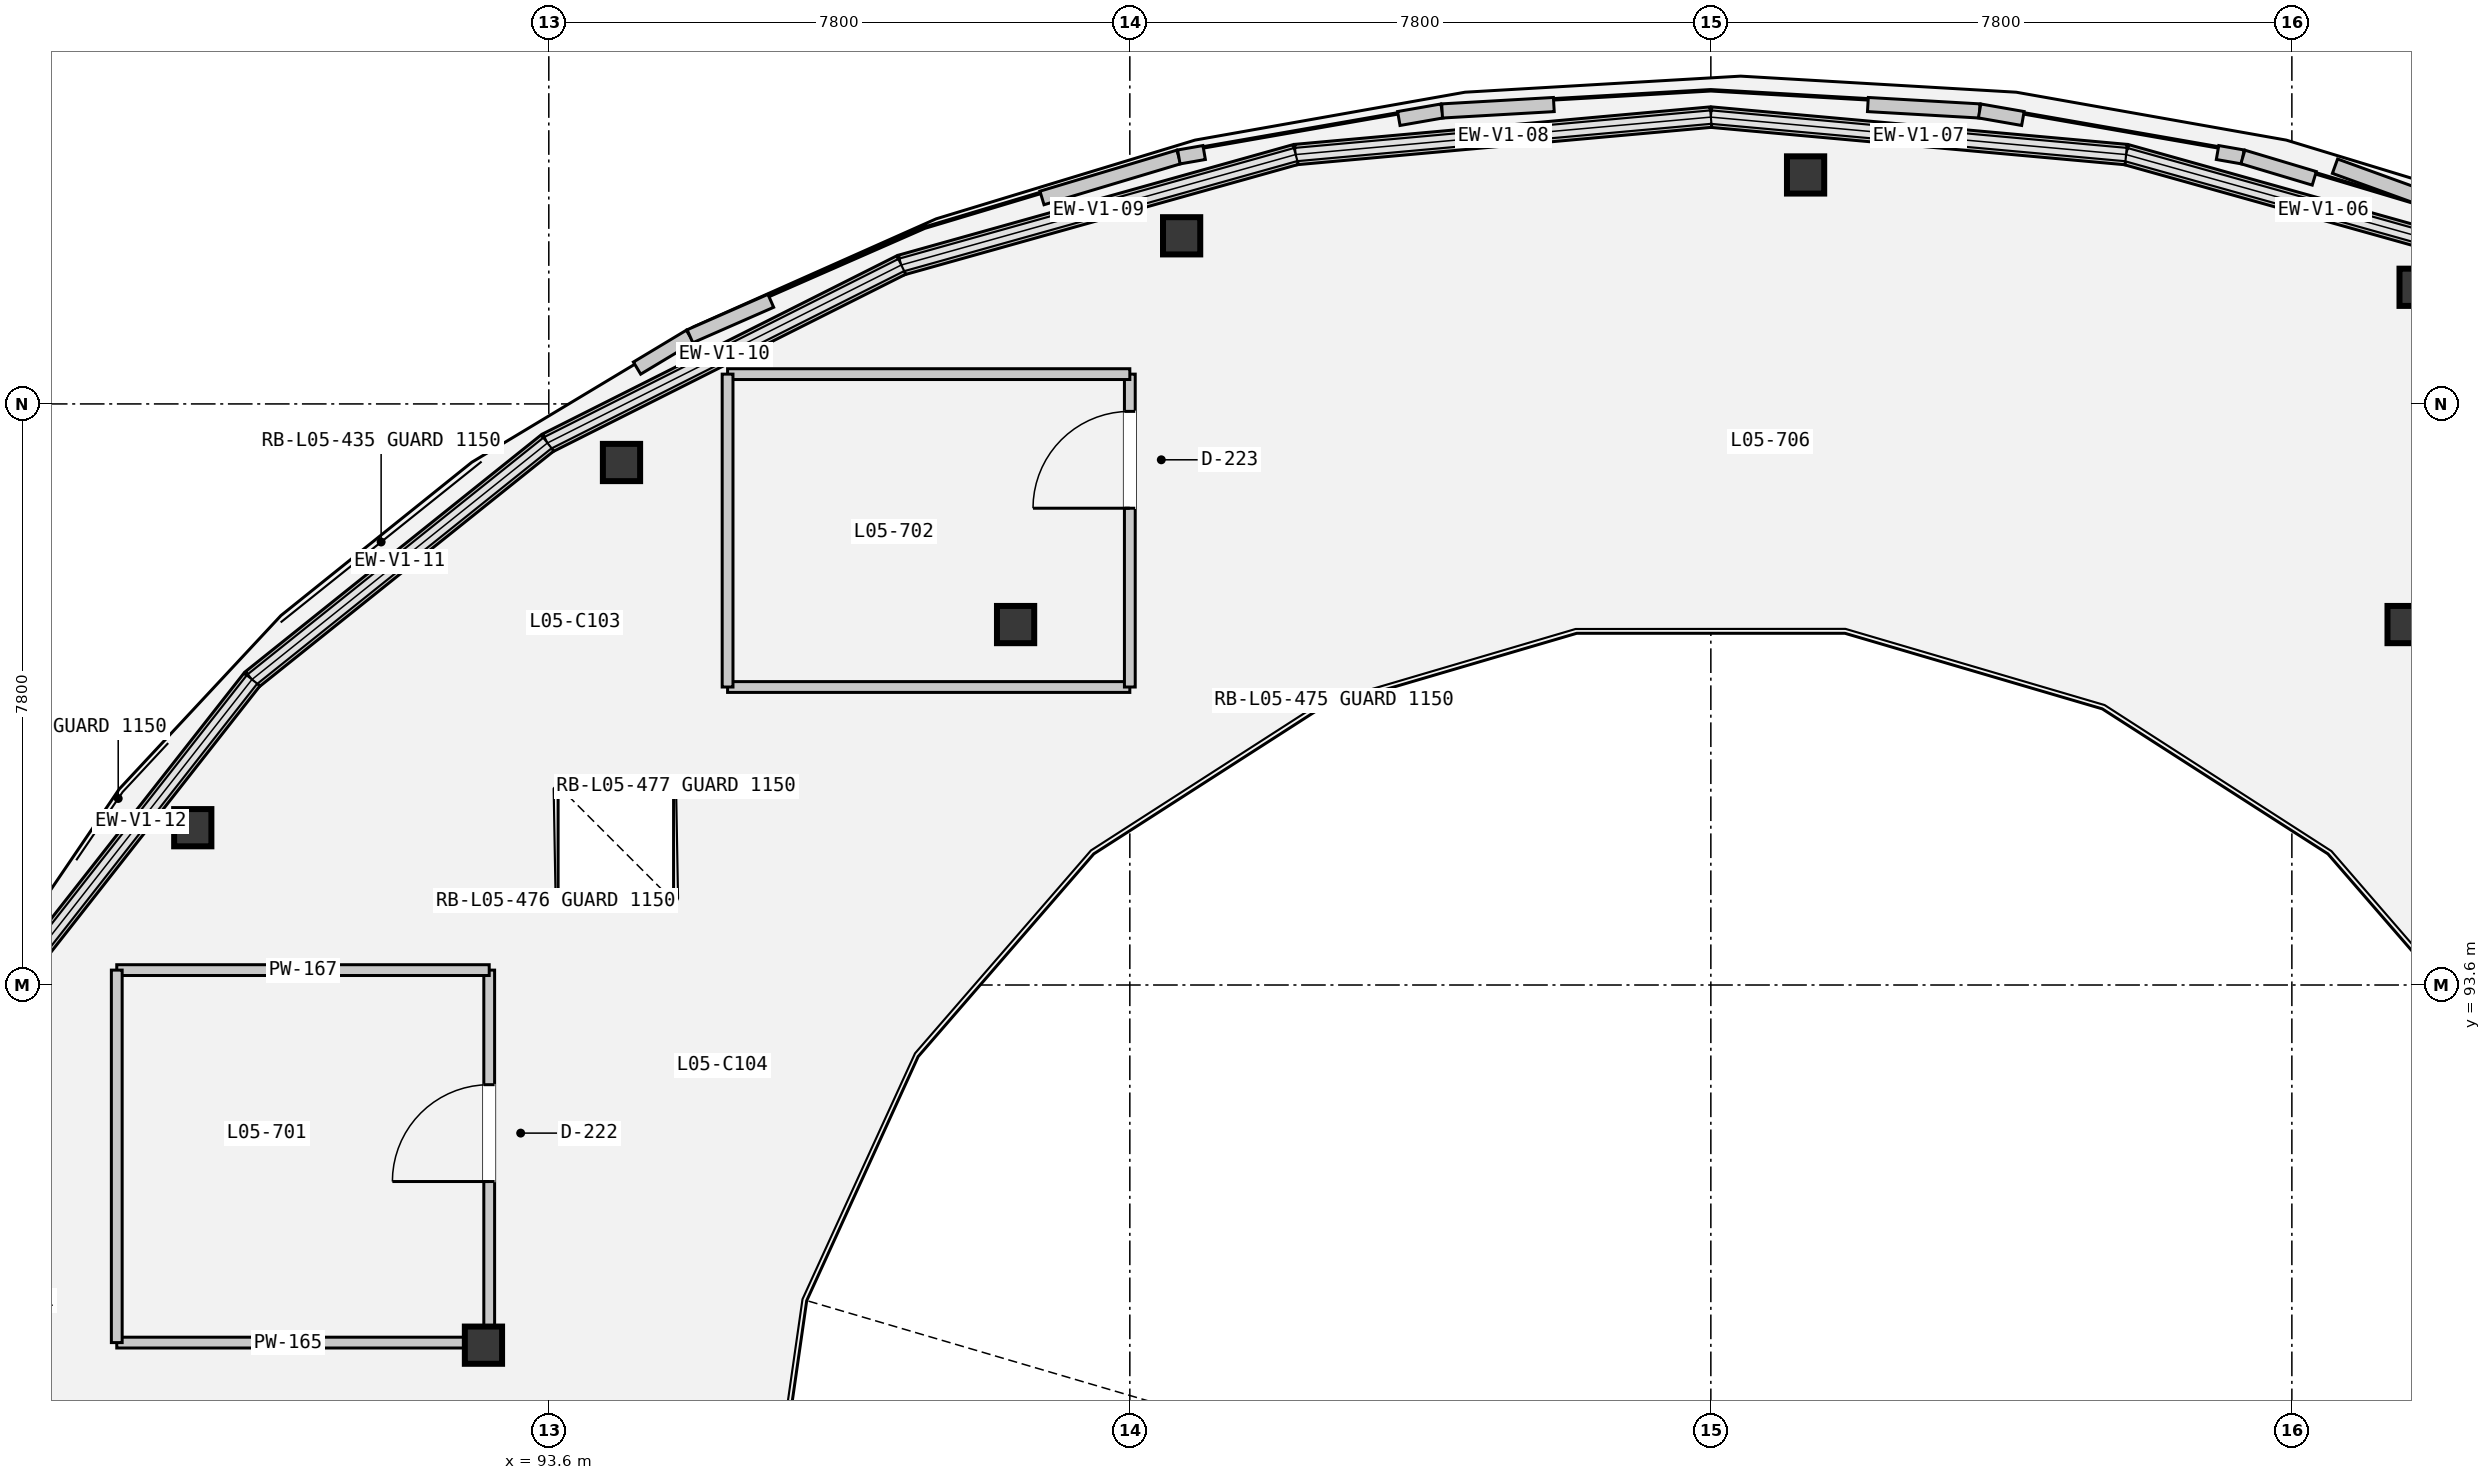
"""IFC4 building model, lengths in metres.
Left out: names, types, materials, properties, quantities, classifications, styles, units other than length and angle.
Written with IfcOpenShell. Run it as: python <this file> out.ifc"""

import sys

from ifc_helpers import new_model, si_unit, direction, frame, frame_2d, origin, origin_2d, place, context, subcontext, project, spatial, rectangle, extrude, element, fill, save


model = new_model("IFC4")
c1 = context("Model", 3, precision=1e-05, world=origin(), true_north=direction((0.0, 1.0)))
c2 = subcontext(c1, "Body", "Model", "MODEL_VIEW")
j1 = project(units=[si_unit("LENGTHUNIT", "METRE"), si_unit("PLANEANGLEUNIT", "RADIAN")], contexts=[c1])
p1 = place(None, origin())
s1 = spatial("IfcSite", under=j1, at=p1, CompositionType="ELEMENT")
p2 = place(p1, origin())
s2 = spatial("IfcBuilding", under=s1, at=p2, CompositionType="ELEMENT")
p3 = place(p2, frame((0.0, 0.0, 24.3)))
s3 = spatial("IfcBuildingStorey", under=s2, at=p3, CompositionType="ELEMENT", Elevation=24.3)
for number, where, z_axis, x_axis in (
    (1, (118.695, 102.966, 0.0), (0.0, 0.0, 1.0), (1.0, 0.0, 0.0)),
    (2, (110.472, 104.474, 0.0), (0.0, 0.0, 1.0), (1.0, 0.0, 0.0)),
    (3, (102.095, 103.657, 0.0), (0.0, 0.0, 1.0), (1.0, 0.0, 0.0)),
    (4, (94.576, 100.614, 0.0), (0.0, 0.0, 1.0), (1.0, 0.0, 0.0)),
    (5, (88.82, 95.711, 0.0), (0.0, 0.0, 1.0), (1.0, 0.0, 0.0)),
    (6, (118.534, 98.438, 0.0), (0.0, 0.0, 1.0), (1.0, 0.0, 0.0)),
    (7, (99.866, 98.438, 0.0), (0.0, 0.0, 1.0), (1.0, 0.0, 0.0)),
    (8, (92.723, 88.765, 0.0), (0.0, 0.0, 1.0), (1.0, 0.0, 0.0)),
):
    element("IfcColumn", number, at=place(p3, frame(where, z_axis=z_axis, x_axis=x_axis)), inside=s3, PredefinedType="COLUMN", context=c2, shape_type="SweptSolid", body=[
        extrude(rectangle(XDim=0.5, YDim=0.5, at=origin_2d()), origin(), (0.0, 0.0, 1.0), 4.5),
    ])
p4 = place(p3, frame((120.069, 103.264, 0.0), z_axis=(0.0, 0.0, 1.0), x_axis=(-0.962945110284, 0.269697450079, 0.0)))
e9 = element("IfcWall", 9, at=p4, inside=s3, PredefinedType="SOLIDWALL", context=c2, shape_type="SweptSolid", body=[
    extrude(rectangle(XDim=5.499, YDim=0.275, at=frame_2d((2.749, 0.0))), origin(), (0.0, 0.0, 1.0), 1.02),
])
p5 = place(p3, frame((114.774, 104.747, 0.0), z_axis=(0.0, 0.0, 1.0), x_axis=(-0.995958378124, 0.08981597322, 0.0)))
e10 = element("IfcWall", 10, at=p5, inside=s3, PredefinedType="SOLIDWALL", context=c2, shape_type="SweptSolid", body=[
    extrude(rectangle(XDim=5.597, YDim=0.275, at=frame_2d((2.798, 0.0))), origin(), (0.0, 0.0, 1.0), 1.02),
])
p6 = place(p3, frame((109.2, 105.25, 0.0), z_axis=(0.0, 0.0, 1.0), x_axis=(-0.995958026213, -0.089819875431, 0.0)))
e11 = element("IfcWall", 11, at=p6, inside=s3, PredefinedType="SOLIDWALL", context=c2, shape_type="SweptSolid", body=[
    extrude(rectangle(XDim=5.597, YDim=0.275, at=frame_2d((2.798, 0.0))), origin(), (0.0, 0.0, 1.0), 1.02),
])
p7 = place(p3, frame((103.626, 104.747, 0.0), z_axis=(0.0, 0.0, 1.0), x_axis=(-0.962945110284, -0.269697450079, 0.0)))
e12 = element("IfcWall", 12, at=p7, inside=s3, PredefinedType="SOLIDWALL", context=c2, shape_type="SweptSolid", body=[
    extrude(rectangle(XDim=5.499, YDim=0.275, at=frame_2d((2.749, 0.0))), origin(), (0.0, 0.0, 1.0), 1.02),
])
p8 = place(p3, frame((98.331, 103.264, 0.0), z_axis=(0.0, 0.0, 1.0), x_axis=(-0.893386975115, -0.449288006401, 0.0)))
e13 = element("IfcWall", 13, at=p8, inside=s3, PredefinedType="SOLIDWALL", context=c2, shape_type="SweptSolid", body=[
    extrude(rectangle(XDim=5.317, YDim=0.275, at=frame_2d((2.658, 0.0))), origin(), (0.0, 0.0, 1.0), 1.02),
])
p9 = place(p3, frame((93.582, 100.876, 0.0), z_axis=(0.0, 0.0, 1.0), x_axis=(-0.780718767482, -0.624882553846, 0.0)))
e14 = element("IfcWall", 14, at=p9, inside=s3, PredefinedType="SOLIDWALL", context=c2, shape_type="SweptSolid", body=[
    extrude(rectangle(XDim=5.081, YDim=0.275, at=frame_2d((2.54, 0.0))), origin(), (0.0, 0.0, 1.0), 1.02),
])
p10 = place(p3, frame((89.615, 97.701, 0.0), z_axis=(0.0, 0.0, 1.0), x_axis=(-0.617498011037, -0.786572441906, 0.0)))
e15 = element("IfcWall", 15, at=p10, inside=s3, PredefinedType="SOLIDWALL", context=c2, shape_type="SweptSolid", body=[
    extrude(rectangle(XDim=4.833, YDim=0.275, at=frame_2d((2.417, 0.0))), origin(), (0.0, 0.0, 1.0), 1.02),
])
p11 = place(p3, frame((122.51, 102.804, 0.0), z_axis=(0.0, 0.0, 1.0), x_axis=(-0.940147622519, 0.340767439571, 0.0)))
e16 = element("IfcWall", 16, at=p11, inside=s3, PredefinedType="PARAPET", context=c2, shape_type="SweptSolid", body=[
    extrude(rectangle(XDim=5.245, YDim=0.205, at=frame_2d((2.623, 0.0))), origin(), (0.0, 0.0, 1.0), 0.92),
])
p12 = place(p3, frame((87.8, 88.8, 0.0), z_axis=(0.0, 0.0, 1.0), x_axis=(1.0, 0.0, 0.0)))
e17 = element("IfcWall", 17, at=p12, inside=s3, PredefinedType="PARTITIONING", context=c2, shape_type="SweptSolid", body=[
    extrude(rectangle(XDim=5.0, YDim=0.145, at=frame_2d((2.5, 0.0))), origin(), (0.0, 0.0, 1.0), 3.45),
])
p13 = place(p3, frame((92.8, 88.8, 0.0), z_axis=(0.0, 0.0, 1.0), x_axis=(0.0, 1.0, 0.0)))
e18 = element("IfcWall", 18, at=p13, inside=s3, PredefinedType="PARTITIONING", context=c2, shape_type="SweptSolid", body=[
    extrude(rectangle(XDim=5.0, YDim=0.145, at=frame_2d((2.5, 0.0))), origin(), (0.0, 0.0, 1.0), 3.45),
])
p14 = place(p13, frame((2.162, 0.0, 0.0)))
e19 = element("IfcOpeningElement", 19, at=p14, cuts=e18, PredefinedType="OPENING", context=c2, shape_type="SweptSolid", body=[
    extrude(rectangle(XDim=1.3, YDim=2.25, at=frame_2d((0.65, 1.125))), frame((0.0, 0.083, 0.0), z_axis=(0.0, -1.0, 0.0), x_axis=(1.0, 0.0, 0.0)), (0.0, 0.0, 1.0), 0.165),
])
for number, where, z_axis, x_axis in (
    (20, (92.8, 93.8, 0.0), (0.0, 0.0, 1.0), (-1.0, 0.0, 0.0)),
    (21, (87.8, 93.8, 0.0), (0.0, 0.0, 1.0), (0.0, -1.0, 0.0)),
):
    element("IfcWall", number, at=place(p3, frame(where, z_axis=z_axis, x_axis=x_axis)), inside=s3, PredefinedType="PARTITIONING", context=c2, shape_type="SweptSolid", body=[
        extrude(rectangle(XDim=5.0, YDim=0.145, at=frame_2d((2.5, 0.0))), origin(), (0.0, 0.0, 1.0), 3.45),
    ])
p15 = place(p3, frame((96.0, 97.6, 0.0), z_axis=(0.0, 0.0, 1.0), x_axis=(1.0, 0.0, 0.0)))
e22 = element("IfcWall", 22, at=p15, inside=s3, PredefinedType="PARTITIONING", context=c2, shape_type="SweptSolid", body=[
    extrude(rectangle(XDim=5.4, YDim=0.145, at=frame_2d((2.7, 0.0))), origin(), (0.0, 0.0, 1.0), 3.45),
])
p16 = place(p3, frame((101.4, 97.6, 0.0), z_axis=(0.0, 0.0, 1.0), x_axis=(0.0, 1.0, 0.0)))
e23 = element("IfcWall", 23, at=p16, inside=s3, PredefinedType="PARTITIONING", context=c2, shape_type="SweptSolid", body=[
    extrude(rectangle(XDim=4.2, YDim=0.145, at=frame_2d((2.1, 0.0))), origin(), (0.0, 0.0, 1.0), 3.45),
])
p17 = place(p16, frame((2.4, 0.0, 0.0)))
e24 = element("IfcOpeningElement", 24, at=p17, cuts=e23, PredefinedType="OPENING", context=c2, shape_type="SweptSolid", body=[
    extrude(rectangle(XDim=1.3, YDim=2.25, at=frame_2d((0.65, 1.125))), frame((0.0, 0.083, 0.0), z_axis=(0.0, -1.0, 0.0), x_axis=(1.0, 0.0, 0.0)), (0.0, 0.0, 1.0), 0.165),
])
p18 = place(p3, frame((101.4, 101.8, 0.0), z_axis=(0.0, 0.0, 1.0), x_axis=(-1.0, 0.0, 0.0)))
e25 = element("IfcWall", 25, at=p18, inside=s3, PredefinedType="PARTITIONING", context=c2, shape_type="SweptSolid", body=[
    extrude(rectangle(XDim=5.4, YDim=0.145, at=frame_2d((2.7, 0.0))), origin(), (0.0, 0.0, 1.0), 3.45),
])
p19 = place(p3, frame((96.0, 101.8, 0.0), z_axis=(0.0, 0.0, 1.0), x_axis=(0.0, -1.0, 0.0)))
e26 = element("IfcWall", 26, at=p19, inside=s3, PredefinedType="PARTITIONING", context=c2, shape_type="SweptSolid", body=[
    extrude(rectangle(XDim=4.2, YDim=0.145, at=frame_2d((2.1, 0.0))), origin(), (0.0, 0.0, 1.0), 3.45),
])
p20 = place(p3, frame((94.785, 101.881, 0.0), z_axis=(0.0, 0.0, 1.0), x_axis=(0.857050982718, 0.515231611047, 0.0)))
e27 = element("IfcWall", 27, at=p20, inside=s3, PredefinedType="PARAPET", context=c2, shape_type="SweptSolid", body=[
    extrude(rectangle(XDim=0.829, YDim=0.19, at=frame_2d((0.415, 0.0))), origin(), (0.0, 0.0, 1.0), 1.12),
])
p21 = place(p3, frame((95.495, 102.308, 0.0), z_axis=(0.0, 0.0, 1.0), x_axis=(0.91572170877, 0.401813081031, 0.0)))
e28 = element("IfcWall", 28, at=p21, inside=s3, PredefinedType="PARAPET", context=c2, shape_type="SweptSolid", body=[
    extrude(rectangle(XDim=1.185, YDim=0.19, at=frame_2d((0.592, 0.0))), origin(), (0.0, 0.0, 1.0), 1.12),
])
p22 = place(p3, frame((100.221, 104.165, 0.0), z_axis=(0.0, 0.0, 1.0), x_axis=(0.957948828527, 0.286939090964, 0.0)))
e29 = element("IfcWall", 29, at=p22, inside=s3, PredefinedType="PARAPET", context=c2, shape_type="SweptSolid", body=[
    extrude(rectangle(XDim=1.918, YDim=0.19, at=frame_2d((0.959, 0.0))), origin(), (0.0, 0.0, 1.0), 1.12),
])
p23 = place(p3, frame((102.058, 104.715, 0.0), z_axis=(0.0, 0.0, 1.0), x_axis=(0.985003439963, 0.172534701616, 0.0)))
e30 = element("IfcWall", 30, at=p23, inside=s3, PredefinedType="PARAPET", context=c2, shape_type="SweptSolid", body=[
    extrude(rectangle(XDim=0.345, YDim=0.19, at=frame_2d((0.173, 0.0))), origin(), (0.0, 0.0, 1.0), 1.12),
])
p24 = place(p3, frame((105.011, 105.231, 0.0), z_axis=(0.0, 0.0, 1.0), x_axis=(0.985065586189, 0.172179531031, 0.0)))
e31 = element("IfcWall", 31, at=p24, inside=s3, PredefinedType="PARAPET", context=c2, shape_type="SweptSolid", body=[
    extrude(rectangle(XDim=0.59, YDim=0.19, at=frame_2d((0.295, 0.0))), origin(), (0.0, 0.0, 1.0), 1.12),
])
for number, where, z_axis, x_axis in (
    (32, (105.592, 105.333, 0.0), (0.0, 0.0, 1.0), (0.998, 0.057, 0.0)),
    (33, (111.308, 105.419, 0.0), (0.0, 0.0, 1.0), (0.998, -0.057, 0.0)),
):
    element("IfcWall", number, at=place(p3, frame(where, z_axis=z_axis, x_axis=x_axis)), inside=s3, PredefinedType="PARAPET", context=c2, shape_type="SweptSolid", body=[
        extrude(rectangle(XDim=1.502, YDim=0.19, at=frame_2d((0.751, 0.0))), origin(), (0.0, 0.0, 1.0), 1.12),
    ])
p25 = place(p3, frame((112.808, 105.333, 0.0), z_axis=(0.0, 0.0, 1.0), x_axis=(0.985065586189, -0.172179531031, 0.0)))
e34 = element("IfcWall", 34, at=p25, inside=s3, PredefinedType="PARAPET", context=c2, shape_type="SweptSolid", body=[
    extrude(rectangle(XDim=0.59, YDim=0.19, at=frame_2d((0.295, 0.0))), origin(), (0.0, 0.0, 1.0), 1.12),
])
p26 = place(p3, frame((116.002, 104.775, 0.0), z_axis=(0.0, 0.0, 1.0), x_axis=(0.985003439963, -0.172534701616, 0.0)))
e35 = element("IfcWall", 35, at=p26, inside=s3, PredefinedType="PARAPET", context=c2, shape_type="SweptSolid", body=[
    extrude(rectangle(XDim=0.345, YDim=0.19, at=frame_2d((0.173, 0.0))), origin(), (0.0, 0.0, 1.0), 1.12),
])
p27 = place(p3, frame((116.342, 104.715, 0.0), z_axis=(0.0, 0.0, 1.0), x_axis=(0.95794708159, -0.286944923064, 0.0)))
e36 = element("IfcWall", 36, at=p27, inside=s3, PredefinedType="PARAPET", context=c2, shape_type="SweptSolid", body=[
    extrude(rectangle(XDim=1.0, YDim=0.19, at=frame_2d((0.5, 0.0))), origin(), (0.0, 0.0, 1.0), 1.12),
])
p28 = place(p14, origin())
e37 = element("IfcDoor", 37, at=p28, inside=s3, OperationType="SINGLE_SWING_LEFT", PredefinedType="DOOR", context=c2, shape_type="SweptSolid", body=[
    extrude(rectangle(XDim=1.3, YDim=2.25, at=frame_2d((0.65, 1.125))), frame((0.0, 0.025, 0.0), z_axis=(0.0, -1.0, 0.0), x_axis=(1.0, 0.0, 0.0)), (0.0, 0.0, 1.0), 0.05),
])
fill(e19, e37)
p29 = place(p17, origin())
e38 = element("IfcDoor", 38, at=p29, inside=s3, OperationType="SINGLE_SWING_RIGHT", PredefinedType="DOOR", context=c2, shape_type="SweptSolid", body=[
    extrude(rectangle(XDim=1.3, YDim=2.25, at=frame_2d((0.65, 1.125))), frame((0.0, 0.025, 0.0), z_axis=(0.0, -1.0, 0.0), x_axis=(1.0, 0.0, 0.0)), (0.0, 0.0, 1.0), 0.05),
])
fill(e24, e38)
save(model, sys.argv[1])
